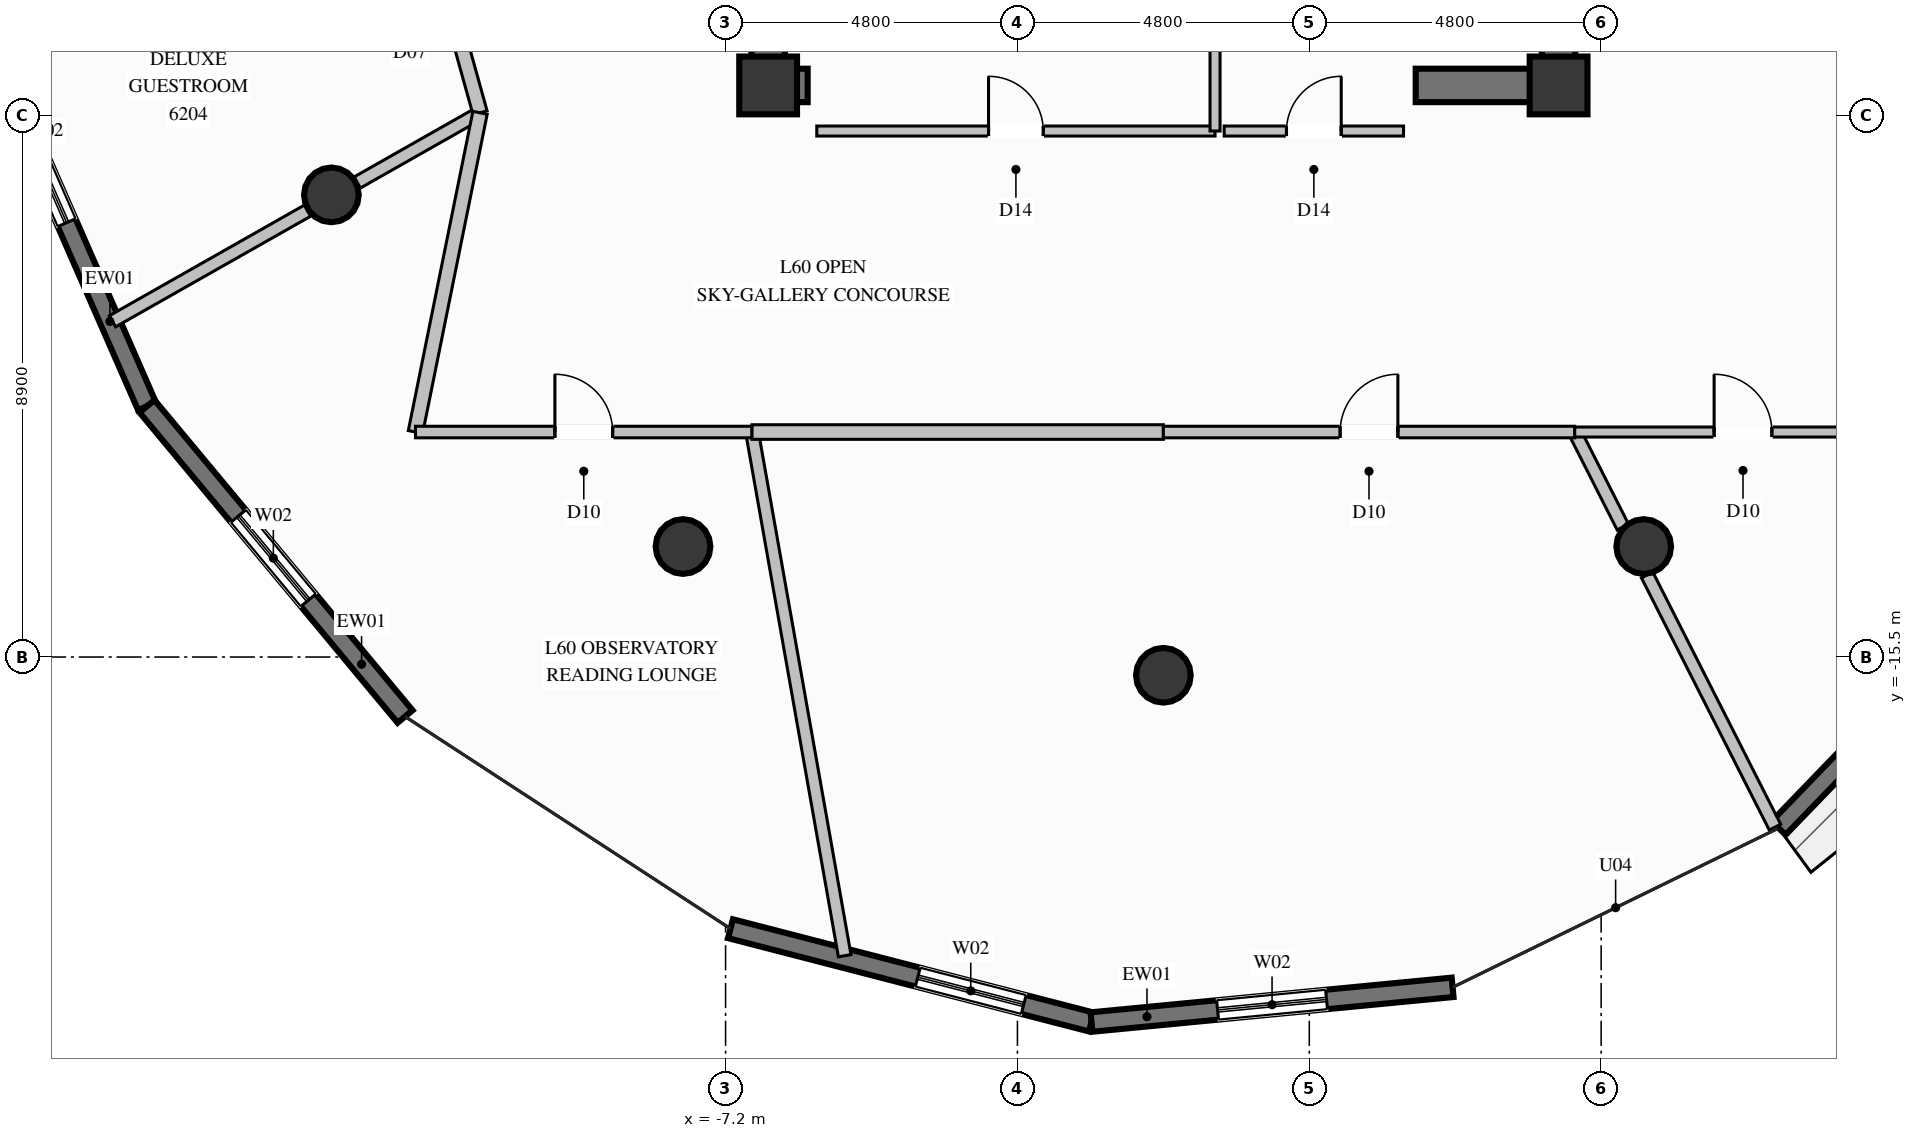
"""IFC4 building model, lengths in metres.
Left out: names, types, materials, properties, quantities, classifications, styles, units other than length and angle.
Written with IfcOpenShell. Run it as: python <this file> out.ifc"""

import sys

from ifc_helpers import new_model, si_unit, direction, frame, frame_2d, origin, origin_2d, place, context, subcontext, project, spatial, rectangle, circle, extrude, element, fill, save


model = new_model("IFC4")
c1 = context("Model", 3, precision=1e-05, world=origin(), true_north=direction((0.0, 1.0)))
c2 = subcontext(c1, "Body", "Model", "MODEL_VIEW")
j1 = project(units=[si_unit("LENGTHUNIT", "METRE"), si_unit("PLANEANGLEUNIT", "RADIAN")], contexts=[c1])
p1 = place(None, origin())
s1 = spatial("IfcSite", under=j1, at=p1, CompositionType="ELEMENT")
p2 = place(p1, origin())
s2 = spatial("IfcBuilding", under=s1, at=p2, CompositionType="ELEMENT")
p3 = place(p2, frame((0.0, 0.0, 230.8)))
s3 = spatial("IfcBuildingStorey", under=s2, at=p3, CompositionType="ELEMENT", Elevation=230.8)
for number, where, z_axis, x_axis in (
    (1, (-6.5, -6.1, 0.0), (0.0, 0.0, 1.0), (1.0, 0.0, 0.0)),
    (2, (6.5, -6.1, 0.0), (0.0, 0.0, 1.0), (1.0, 0.0, 0.0)),
):
    element("IfcColumn", number, at=place(p3, frame(where, z_axis=z_axis, x_axis=x_axis)), inside=s3, PredefinedType="COLUMN", context=c2, shape_type="SweptSolid", body=[
        extrude(rectangle(XDim=0.95, YDim=0.95, at=origin_2d()), origin(), (0.0, 0.0, 1.0), 3.6),
    ])
p4 = place(p3, frame((-6.225, -6.1, 0.0), z_axis=(0.0, 0.0, 1.0), x_axis=(1.0, 0.0, 0.0)))
e3 = element("IfcWall", 3, at=p4, inside=s3, PredefinedType="SHEAR", context=c2, shape_type="SweptSolid", body=[
    extrude(rectangle(XDim=0.375, YDim=0.55, at=frame_2d((0.188, 0.0))), origin(), (0.0, 0.0, 1.0), 3.6),
])
p5 = place(p3, frame((4.15, -6.1, 0.0), z_axis=(0.0, 0.0, 1.0), x_axis=(1.0, 0.0, 0.0)))
e4 = element("IfcWall", 4, at=p5, inside=s3, PredefinedType="SHEAR", context=c2, shape_type="SweptSolid", body=[
    extrude(rectangle(XDim=2.075, YDim=0.55, at=frame_2d((1.038, 0.0))), origin(), (0.0, 0.0, 1.0), 3.6),
])
p6 = place(p3, frame((-6.5, -6.375, 0.0), z_axis=(0.0, 0.0, 1.0), x_axis=(0.0, 1.0, 0.0)))
e5 = element("IfcWall", 5, at=p6, inside=s3, PredefinedType="SHEAR", context=c2, shape_type="SweptSolid", body=[
    extrude(rectangle(XDim=3.025, YDim=0.55, at=frame_2d((1.512, 0.0))), origin(), (0.0, 0.0, 1.0), 3.6),
])
p7 = place(p3, frame((6.5, -6.375, 0.0), z_axis=(0.0, 0.0, 1.0), x_axis=(0.0, 1.0, 0.0)))
e6 = element("IfcWall", 6, at=p7, inside=s3, PredefinedType="SHEAR", context=c2, shape_type="SweptSolid", body=[
    extrude(rectangle(XDim=4.025, YDim=0.55, at=frame_2d((2.012, 0.0))), origin(), (0.0, 0.0, 1.0), 3.6),
])
for number, where, z_axis, x_axis in (
    (7, (-13.683, -7.9, 0.0), (0.0, 0.0, 1.0), (1.0, 0.0, 0.0)),
    (8, (-7.9, -13.683, 0.0), (0.0, 0.0, 1.0), (1.0, 0.0, 0.0)),
    (9, (0.0, -15.8, 0.0), (0.0, 0.0, 1.0), (1.0, 0.0, 0.0)),
    (10, (7.9, -13.683, 0.0), (0.0, 0.0, 1.0), (1.0, 0.0, 0.0)),
):
    element("IfcColumn", number, at=place(p3, frame(where, z_axis=z_axis, x_axis=x_axis)), inside=s3, PredefinedType="COLUMN", context=c2, shape_type="SweptSolid", body=[
        extrude(circle(Radius=0.45, at=origin_2d()), origin(), (0.0, 0.0, 1.0), 3.6),
    ])
p8 = place(p3, frame((14.377, -13.901, 0.0), z_axis=(0.0, 0.0, 1.0), x_axis=(-0.694433198018, -0.71955717875, 0.0)))
e11 = element("IfcWall", 11, at=p8, inside=s3, PredefinedType="SOLIDWALL", context=c2, shape_type="SweptSolid", body=[
    extrude(rectangle(XDim=6.132, YDim=0.32, at=frame_2d((3.066, 0.0))), origin(), (0.0, 0.0, 1.0), 3.2),
])
p9 = place(p8, frame((2.454, 0.0, 0.35)))
e12 = element("IfcOpeningElement", 12, at=p9, cuts=e11, PredefinedType="OPENING", context=c2, shape_type="SweptSolid", body=[
    extrude(rectangle(XDim=1.8, YDim=2.6, at=frame_2d((0.9, 1.3))), frame((0.0, 0.17, 0.0), z_axis=(0.0, -1.0, 0.0), x_axis=(1.0, 0.0, 0.0)), (0.0, 0.0, 1.0), 0.34),
])
p10 = place(p3, frame((-16.715, -11.376, 0.0), z_axis=(0.0, 0.0, 1.0), x_axis=(-0.401047234641, 0.916057375707, 0.0)))
e13 = element("IfcWall", 13, at=p10, inside=s3, PredefinedType="SOLIDWALL", context=c2, shape_type="SweptSolid", body=[
    extrude(rectangle(XDim=6.785, YDim=0.32, at=frame_2d((3.392, 0.0))), origin(), (0.0, 0.0, 1.0), 3.2),
])
p11 = place(p10, frame((3.296, 0.0, 0.35)))
e14 = element("IfcOpeningElement", 14, at=p11, cuts=e13, PredefinedType="OPENING", context=c2, shape_type="SweptSolid", body=[
    extrude(rectangle(XDim=1.8, YDim=2.6, at=frame_2d((0.9, 1.3))), frame((0.0, 0.17, 0.0), z_axis=(0.0, -1.0, 0.0), x_axis=(1.0, 0.0, 0.0)), (0.0, 0.0, 1.0), 0.34),
])
p12 = place(p3, frame((-12.471, -16.479, 0.0), z_axis=(0.0, 0.0, 1.0), x_axis=(-0.639438786748, 0.76884201108, 0.0)))
e15 = element("IfcWall", 15, at=p12, inside=s3, PredefinedType="SOLIDWALL", context=c2, shape_type="SweptSolid", body=[
    extrude(rectangle(XDim=6.637, YDim=0.32, at=frame_2d((3.319, 0.0))), origin(), (0.0, 0.0, 1.0), 3.2),
])
p13 = place(p12, frame((2.488, 0.0, 0.35)))
e16 = element("IfcOpeningElement", 16, at=p13, cuts=e15, PredefinedType="OPENING", context=c2, shape_type="SweptSolid", body=[
    extrude(rectangle(XDim=1.8, YDim=2.6, at=frame_2d((0.9, 1.3))), frame((0.0, 0.17, 0.0), z_axis=(0.0, -1.0, 0.0), x_axis=(1.0, 0.0, 0.0)), (0.0, 0.0, 1.0), 0.34),
])
p14 = place(p3, frame((-1.182, -21.503, 0.0), z_axis=(0.0, 0.0, 1.0), x_axis=(-0.968167541314, 0.250303040227, 0.0)))
e17 = element("IfcWall", 17, at=p14, inside=s3, PredefinedType="SOLIDWALL", context=c2, shape_type="SweptSolid", body=[
    extrude(rectangle(XDim=6.132, YDim=0.32, at=frame_2d((3.066, 0.0))), origin(), (0.0, 0.0, 1.0), 3.2),
])
p15 = place(p14, frame((1.151, 0.0, 0.35)))
e18 = element("IfcOpeningElement", 18, at=p15, cuts=e17, PredefinedType="OPENING", context=c2, shape_type="SweptSolid", body=[
    extrude(rectangle(XDim=1.8, YDim=2.6, at=frame_2d((0.9, 1.3))), frame((0.0, 0.17, 0.0), z_axis=(0.0, -1.0, 0.0), x_axis=(1.0, 0.0, 0.0)), (0.0, 0.0, 1.0), 0.34),
])
p16 = place(p3, frame((4.757, -20.932, 0.0), z_axis=(0.0, 0.0, 1.0), x_axis=(-0.995409179042, -0.095710847233, 0.0)))
e19 = element("IfcWall", 19, at=p16, inside=s3, PredefinedType="SOLIDWALL", context=c2, shape_type="SweptSolid", body=[
    extrude(rectangle(XDim=5.966, YDim=0.32, at=frame_2d((2.983, 0.0))), origin(), (0.0, 0.0, 1.0), 3.2),
])
p17 = place(p16, frame((2.083, 0.0, 0.35)))
e20 = element("IfcOpeningElement", 20, at=p17, cuts=e19, PredefinedType="OPENING", context=c2, shape_type="SweptSolid", body=[
    extrude(rectangle(XDim=1.8, YDim=2.6, at=frame_2d((0.9, 1.3))), frame((0.0, 0.17, 0.0), z_axis=(0.0, -1.0, 0.0), x_axis=(1.0, 0.0, 0.0)), (0.0, 0.0, 1.0), 0.34),
])
p18 = place(p3, frame((-5.7, -6.85, 0.0), z_axis=(0.0, 0.0, 1.0), x_axis=(1.0, 0.0, 0.0)))
e21 = element("IfcWall", 21, at=p18, inside=s3, PredefinedType="PARTITIONING", context=c2, shape_type="SweptSolid", body=[
    extrude(rectangle(XDim=6.55, YDim=0.165, at=frame_2d((3.275, 0.0))), origin(), (0.0, 0.0, 1.0), 3.2),
])
p19 = place(p18, frame((2.825, 0.0, 0.0)))
e22 = element("IfcOpeningElement", 22, at=p19, cuts=e21, PredefinedType="OPENING", context=c2, shape_type="SweptSolid", body=[
    extrude(rectangle(XDim=0.9, YDim=2.02, at=frame_2d((0.45, 1.01))), frame((0.0, 0.093, 0.0), z_axis=(0.0, -1.0, 0.0), x_axis=(1.0, 0.0, 0.0)), (0.0, 0.0, 1.0), 0.185),
])
p20 = place(p3, frame((0.85, -6.85, 0.0), z_axis=(0.0, 0.0, 1.0), x_axis=(0.0, 1.0, 0.0)))
e23 = element("IfcWall", 23, at=p20, inside=s3, PredefinedType="PARTITIONING", context=c2, shape_type="SweptSolid", body=[
    extrude(rectangle(XDim=3.35, YDim=0.165, at=frame_2d((1.675, 0.0))), origin(), (0.0, 0.0, 1.0), 3.2),
])
p21 = place(p3, frame((1.0, -6.85, 0.0), z_axis=(0.0, 0.0, 1.0), x_axis=(1.0, 0.0, 0.0)))
e24 = element("IfcWall", 24, at=p21, inside=s3, PredefinedType="PARTITIONING", context=c2, shape_type="SweptSolid", body=[
    extrude(rectangle(XDim=2.95, YDim=0.165, at=frame_2d((1.475, 0.0))), origin(), (0.0, 0.0, 1.0), 3.2),
])
p22 = place(p21, frame((1.025, 0.0, 0.0)))
e25 = element("IfcOpeningElement", 25, at=p22, cuts=e24, PredefinedType="OPENING", context=c2, shape_type="SweptSolid", body=[
    extrude(rectangle(XDim=0.9, YDim=2.02, at=frame_2d((0.45, 1.01))), frame((0.0, 0.093, 0.0), z_axis=(0.0, -1.0, 0.0), x_axis=(1.0, 0.0, 0.0)), (0.0, 0.0, 1.0), 0.185),
])
p23 = place(p3, frame((-11.238, -6.55, 0.0), z_axis=(0.0, 0.0, 1.0), x_axis=(-0.869700542226, -0.493579747207, 0.0)))
e26 = element("IfcWall", 26, at=p23, inside=s3, PredefinedType="PARTITIONING", context=c2, shape_type="SweptSolid", body=[
    extrude(rectangle(XDim=2.324, YDim=0.21, at=frame_2d((1.162, 0.0))), origin(), (0.0, 0.0, 1.0), 2.067),
])
p24 = place(p3, frame((-14.075, -8.159, 0.0), z_axis=(0.0, 0.0, 1.0), x_axis=(-0.869766541186, -0.49346343718, 0.0)))
e27 = element("IfcWall", 27, at=p24, inside=s3, PredefinedType="PARTITIONING", context=c2, shape_type="SweptSolid", body=[
    extrude(rectangle(XDim=3.688, YDim=0.21, at=frame_2d((1.844, 0.0))), origin(), (0.0, 0.0, 1.0), 3.2),
])
p25 = place(p3, frame((-12.26, -2.867, 0.0), z_axis=(0.0, 0.0, 1.0), x_axis=(0.267373718537, -0.963592909187, 0.0)))
e28 = element("IfcWall", 28, at=p25, inside=s3, PredefinedType="PARTITIONING", context=c2, shape_type="SweptSolid", body=[
    extrude(rectangle(XDim=3.822, YDim=0.24, at=frame_2d((1.911, 0.0))), origin(), (0.0, 0.0, 1.0), 3.2),
])
p26 = place(p25, frame((1.411, 0.0, 0.0)))
e29 = element("IfcOpeningElement", 29, at=p26, cuts=e28, PredefinedType="OPENING", context=c2, shape_type="SweptSolid", body=[
    extrude(rectangle(XDim=1.0, YDim=2.2, at=frame_2d((0.5, 1.1))), frame((0.0, 0.13, 0.0), z_axis=(0.0, -1.0, 0.0), x_axis=(1.0, 0.0, 0.0)), (0.0, 0.0, 1.0), 0.26),
])
p27 = place(p3, frame((-6.765, -11.8, 0.0), z_axis=(0.0, 0.0, 1.0), x_axis=(0.174245538019, -0.98470223544, 0.0)))
e30 = element("IfcWall", 30, at=p27, inside=s3, PredefinedType="PARTITIONING", context=c2, shape_type="SweptSolid", body=[
    extrude(rectangle(XDim=8.746, YDim=0.21, at=frame_2d((4.373, 0.0))), origin(), (0.0, 0.0, 1.0), 3.2),
])
p28 = place(p3, frame((-11.238, -6.55, 0.0), z_axis=(0.0, 0.0, 1.0), x_axis=(-0.198271934001, -0.980147050288, 0.0)))
e31 = element("IfcWall", 31, at=p28, inside=s3, PredefinedType="PARTITIONING", context=c2, shape_type="SweptSolid", body=[
    extrude(rectangle(XDim=5.356, YDim=0.24, at=frame_2d((2.678, 0.0))), origin(), (0.0, 0.0, 1.0), 3.2),
])
p29 = place(p3, frame((-12.3, -11.8, 0.0), z_axis=(0.0, 0.0, 1.0), x_axis=(1.0, 0.0, 0.0)))
e32 = element("IfcWall", 32, at=p29, inside=s3, PredefinedType="PARTITIONING", context=c2, shape_type="SweptSolid", body=[
    extrude(rectangle(XDim=5.535, YDim=0.19, at=frame_2d((2.768, 0.0))), origin(), (0.0, 0.0, 1.0), 3.2),
])
p30 = place(p29, frame((2.293, 0.0, 0.0)))
e33 = element("IfcOpeningElement", 33, at=p30, cuts=e32, PredefinedType="OPENING", context=c2, shape_type="SweptSolid", body=[
    extrude(rectangle(XDim=0.95, YDim=2.1, at=frame_2d((0.475, 1.05))), frame((0.0, 0.105, 0.0), z_axis=(0.0, -1.0, 0.0), x_axis=(1.0, 0.0, 0.0)), (0.0, 0.0, 1.0), 0.21),
])
p31 = place(p3, frame((6.765, -11.8, 0.0), z_axis=(0.0, 0.0, 1.0), x_axis=(0.452225083285, -0.891903847983, 0.0)))
e34 = element("IfcWall", 34, at=p31, inside=s3, PredefinedType="PARTITIONING", context=c2, shape_type="SweptSolid", body=[
    extrude(rectangle(XDim=1.751, YDim=0.21, at=frame_2d((0.875, 0.0))), origin(), (0.0, 0.0, 1.0), 2.067),
])
p32 = place(p3, frame((7.956, -14.15, 0.0), z_axis=(0.0, 0.0, 1.0), x_axis=(0.45218310231, -0.8919251325, 0.0)))
e35 = element("IfcWall", 35, at=p32, inside=s3, PredefinedType="PARTITIONING", context=c2, shape_type="SweptSolid", body=[
    extrude(rectangle(XDim=4.651, YDim=0.21, at=frame_2d((2.325, 0.0))), origin(), (0.0, 0.0, 1.0), 3.2),
])
p33 = place(p3, frame((-6.765, -11.8, 0.0), z_axis=(0.0, 0.0, 1.0), x_axis=(1.0, 0.0, 0.0)))
e36 = element("IfcWall", 36, at=p33, inside=s3, PredefinedType="PARTITIONING", context=c2, shape_type="SweptSolid", body=[
    extrude(rectangle(XDim=6.765, YDim=0.24, at=frame_2d((3.382, 0.0))), origin(), (0.0, 0.0, 1.0), 3.2),
])
p34 = place(p3, frame((0.0, -11.8, 0.0), z_axis=(0.0, 0.0, 1.0), x_axis=(1.0, 0.0, 0.0)))
e37 = element("IfcWall", 37, at=p34, inside=s3, PredefinedType="PARTITIONING", context=c2, shape_type="SweptSolid", body=[
    extrude(rectangle(XDim=6.765, YDim=0.19, at=frame_2d((3.382, 0.0))), origin(), (0.0, 0.0, 1.0), 3.2),
])
p35 = place(p34, frame((2.907, 0.0, 0.0)))
e38 = element("IfcOpeningElement", 38, at=p35, cuts=e37, PredefinedType="OPENING", context=c2, shape_type="SweptSolid", body=[
    extrude(rectangle(XDim=0.95, YDim=2.1, at=frame_2d((0.475, 1.05))), frame((0.0, 0.105, 0.0), z_axis=(0.0, -1.0, 0.0), x_axis=(1.0, 0.0, 0.0)), (0.0, 0.0, 1.0), 0.21),
])
p36 = place(p3, frame((6.765, -11.8, 0.0), z_axis=(0.0, 0.0, 1.0), x_axis=(1.0, 0.0, 0.0)))
e39 = element("IfcWall", 39, at=p36, inside=s3, PredefinedType="PARTITIONING", context=c2, shape_type="SweptSolid", body=[
    extrude(rectangle(XDim=5.535, YDim=0.165, at=frame_2d((2.768, 0.0))), origin(), (0.0, 0.0, 1.0), 3.2),
])
p37 = place(p36, frame((2.293, 0.0, 0.0)))
e40 = element("IfcOpeningElement", 40, at=p37, cuts=e39, PredefinedType="OPENING", context=c2, shape_type="SweptSolid", body=[
    extrude(rectangle(XDim=0.95, YDim=2.1, at=frame_2d((0.475, 1.05))), frame((0.0, 0.093, 0.0), z_axis=(0.0, -1.0, 0.0), x_axis=(1.0, 0.0, 0.0)), (0.0, 0.0, 1.0), 0.185),
])
p38 = place(p11, origin())
e41 = element("IfcWindow", 41, at=p38, inside=s3, PartitioningType="SINGLE_PANEL", PredefinedType="WINDOW", context=c2, shape_type="SweptSolid", body=[
    extrude(rectangle(XDim=1.8, YDim=2.6, at=frame_2d((0.9, 1.3))), frame((0.0, 0.03, 0.0), z_axis=(0.0, -1.0, 0.0), x_axis=(1.0, 0.0, 0.0)), (0.0, 0.0, 1.0), 0.06),
])
fill(e14, e41)
p39 = place(p13, origin())
e42 = element("IfcWindow", 42, at=p39, inside=s3, PartitioningType="SINGLE_PANEL", PredefinedType="WINDOW", context=c2, shape_type="SweptSolid", body=[
    extrude(rectangle(XDim=1.8, YDim=2.6, at=frame_2d((0.9, 1.3))), frame((0.0, 0.03, 0.0), z_axis=(0.0, -1.0, 0.0), x_axis=(1.0, 0.0, 0.0)), (0.0, 0.0, 1.0), 0.06),
])
fill(e16, e42)
p40 = place(p15, origin())
e43 = element("IfcWindow", 43, at=p40, inside=s3, PartitioningType="SINGLE_PANEL", PredefinedType="WINDOW", context=c2, shape_type="SweptSolid", body=[
    extrude(rectangle(XDim=1.8, YDim=2.6, at=frame_2d((0.9, 1.3))), frame((0.0, 0.03, 0.0), z_axis=(0.0, -1.0, 0.0), x_axis=(1.0, 0.0, 0.0)), (0.0, 0.0, 1.0), 0.06),
])
fill(e18, e43)
p41 = place(p17, origin())
e44 = element("IfcWindow", 44, at=p41, inside=s3, PartitioningType="SINGLE_PANEL", PredefinedType="WINDOW", context=c2, shape_type="SweptSolid", body=[
    extrude(rectangle(XDim=1.8, YDim=2.6, at=frame_2d((0.9, 1.3))), frame((0.0, 0.03, 0.0), z_axis=(0.0, -1.0, 0.0), x_axis=(1.0, 0.0, 0.0)), (0.0, 0.0, 1.0), 0.06),
])
fill(e20, e44)
p42 = place(p19, origin())
e45 = element("IfcDoor", 45, at=p42, inside=s3, OperationType="SINGLE_SWING_LEFT", PredefinedType="DOOR", context=c2, shape_type="SweptSolid", body=[
    extrude(rectangle(XDim=0.9, YDim=2.02, at=frame_2d((0.45, 1.01))), frame((0.0, 0.025, 0.0), z_axis=(0.0, -1.0, 0.0), x_axis=(1.0, 0.0, 0.0)), (0.0, 0.0, 1.0), 0.05),
])
fill(e22, e45)
p43 = place(p22, origin())
e46 = element("IfcDoor", 46, at=p43, inside=s3, OperationType="SINGLE_SWING_RIGHT", PredefinedType="DOOR", context=c2, shape_type="SweptSolid", body=[
    extrude(rectangle(XDim=0.9, YDim=2.02, at=frame_2d((0.45, 1.01))), frame((0.0, 0.025, 0.0), z_axis=(0.0, -1.0, 0.0), x_axis=(1.0, 0.0, 0.0)), (0.0, 0.0, 1.0), 0.05),
])
fill(e25, e46)
p44 = place(p30, origin())
e47 = element("IfcDoor", 47, at=p44, inside=s3, OperationType="SINGLE_SWING_LEFT", PredefinedType="DOOR", context=c2, shape_type="SweptSolid", body=[
    extrude(rectangle(XDim=0.95, YDim=2.1, at=frame_2d((0.475, 1.05))), frame((0.0, 0.025, 0.0), z_axis=(0.0, -1.0, 0.0), x_axis=(1.0, 0.0, 0.0)), (0.0, 0.0, 1.0), 0.05),
])
fill(e33, e47)
p45 = place(p35, origin())
e48 = element("IfcDoor", 48, at=p45, inside=s3, OperationType="SINGLE_SWING_RIGHT", PredefinedType="DOOR", context=c2, shape_type="SweptSolid", body=[
    extrude(rectangle(XDim=0.95, YDim=2.1, at=frame_2d((0.475, 1.05))), frame((0.0, 0.025, 0.0), z_axis=(0.0, -1.0, 0.0), x_axis=(1.0, 0.0, 0.0)), (0.0, 0.0, 1.0), 0.05),
])
fill(e38, e48)
p46 = place(p37, origin())
e49 = element("IfcDoor", 49, at=p46, inside=s3, OperationType="SINGLE_SWING_LEFT", PredefinedType="DOOR", context=c2, shape_type="SweptSolid", body=[
    extrude(rectangle(XDim=0.95, YDim=2.1, at=frame_2d((0.475, 1.05))), frame((0.0, 0.025, 0.0), z_axis=(0.0, -1.0, 0.0), x_axis=(1.0, 0.0, 0.0)), (0.0, 0.0, 1.0), 0.05),
])
fill(e40, e49)
save(model, sys.argv[1])
